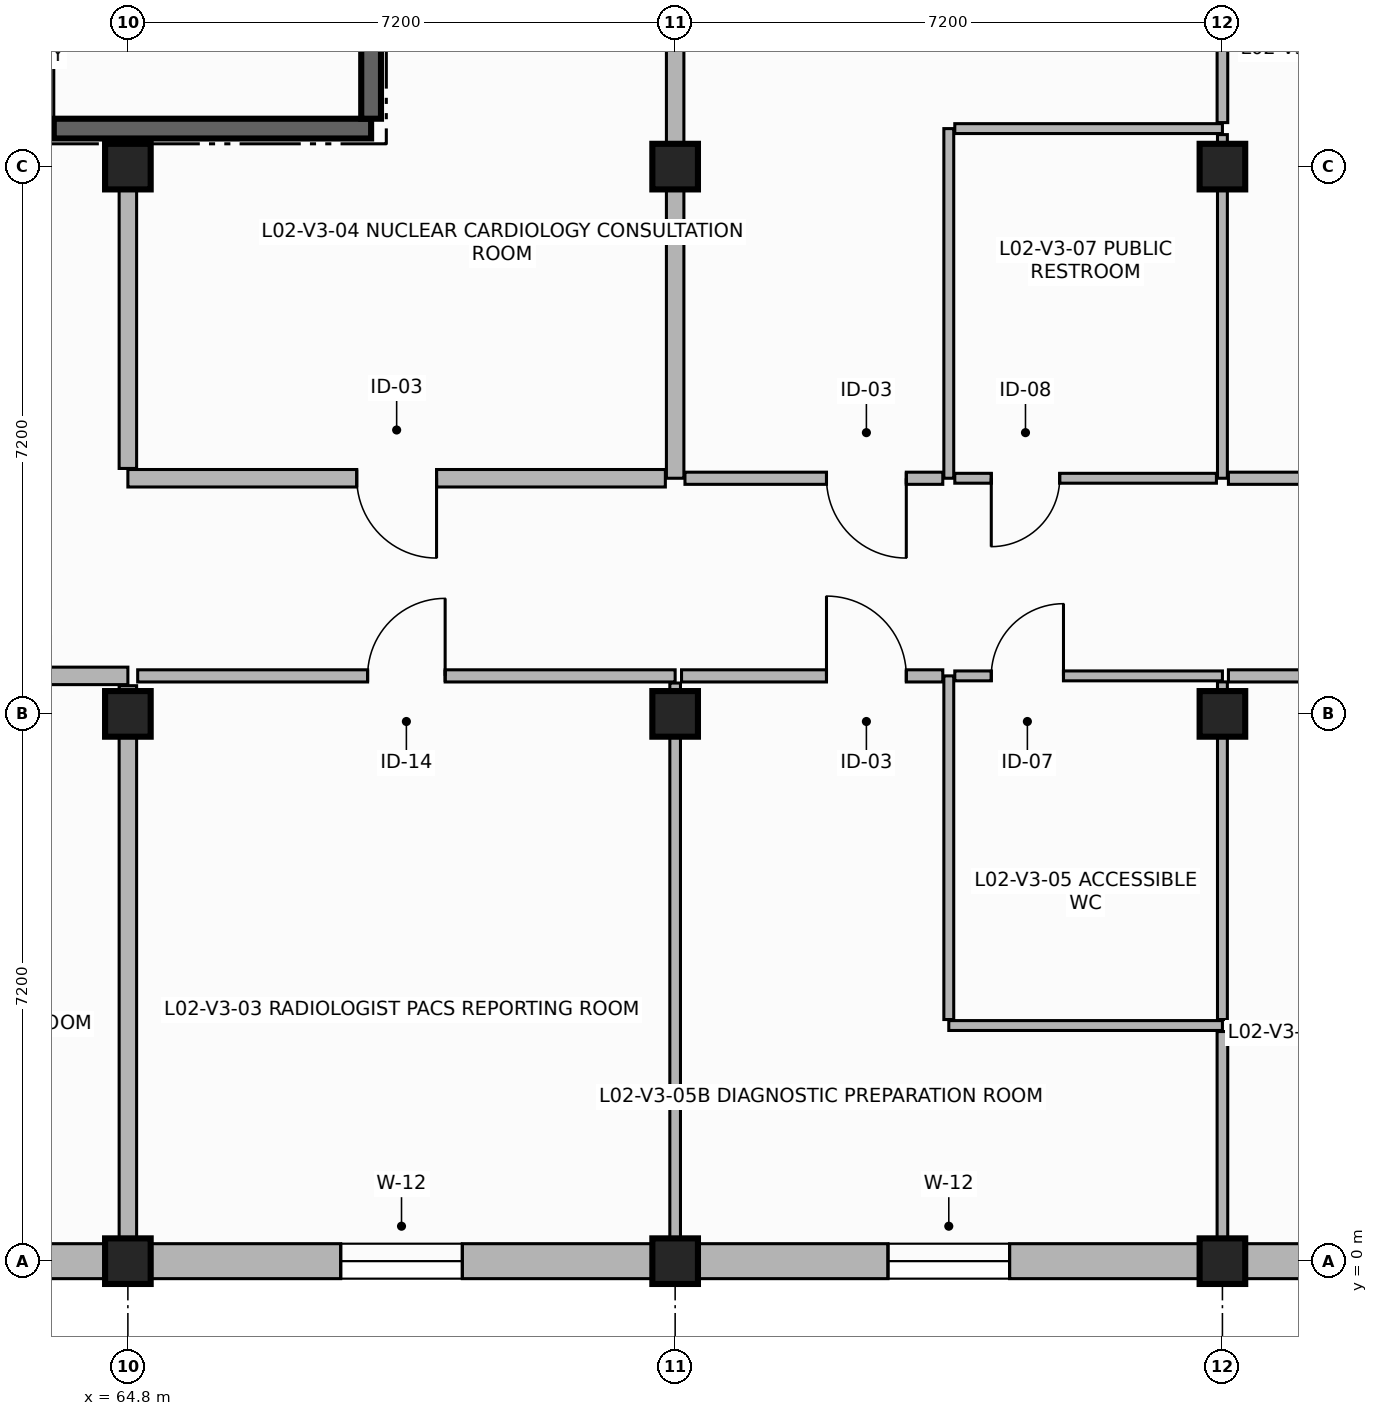
"""IFC4 building model, lengths in metres.
Left out: names, types, materials, properties, quantities, classifications, styles, units other than length and angle.
Written with IfcOpenShell. Run it as: python <this file> out.ifc"""

import sys

from ifc_helpers import new_model, si_unit, direction, frame, frame_2d, origin, origin_2d, place, context, subcontext, project, spatial, rectangle, extrude, element, fill, save


model = new_model("IFC4")
c1 = context("Model", 3, precision=1e-05, world=origin(), true_north=direction((0.0, 1.0)))
c2 = subcontext(c1, "Body", "Model", "MODEL_VIEW")
j1 = project(units=[si_unit("LENGTHUNIT", "METRE"), si_unit("PLANEANGLEUNIT", "RADIAN")], contexts=[c1])
p1 = place(None, origin())
s1 = spatial("IfcSite", under=j1, at=p1, CompositionType="ELEMENT")
p2 = place(p1, origin())
s2 = spatial("IfcBuilding", under=s1, at=p2, CompositionType="ELEMENT")
p3 = place(p2, frame((0.0, 0.0, 8.4)))
s3 = spatial("IfcBuildingStorey", under=s2, at=p3, CompositionType="ELEMENT", Elevation=8.4)
for number, where, z_axis, x_axis in (
    (1, (64.8, 0.0, 0.0), (0.0, 0.0, 1.0), (1.0, 0.0, 0.0)),
    (2, (64.8, 7.2, 0.0), (0.0, 0.0, 1.0), (1.0, 0.0, 0.0)),
    (3, (64.8, 14.4, 0.0), (0.0, 0.0, 1.0), (1.0, 0.0, 0.0)),
    (4, (72.0, 0.0, 0.0), (0.0, 0.0, 1.0), (1.0, 0.0, 0.0)),
    (5, (72.0, 7.2, 0.0), (0.0, 0.0, 1.0), (1.0, 0.0, 0.0)),
    (6, (72.0, 14.4, 0.0), (0.0, 0.0, 1.0), (1.0, 0.0, 0.0)),
    (7, (79.2, 0.0, 0.0), (0.0, 0.0, 1.0), (1.0, 0.0, 0.0)),
    (8, (79.2, 7.2, 0.0), (0.0, 0.0, 1.0), (1.0, 0.0, 0.0)),
    (9, (79.2, 14.4, 0.0), (0.0, 0.0, 1.0), (1.0, 0.0, 0.0)),
):
    element("IfcColumn", number, at=place(p3, frame(where, z_axis=z_axis, x_axis=x_axis)), inside=s3, PredefinedType="COLUMN", context=c2, shape_type="SweptSolid", body=[
        extrude(rectangle(XDim=0.6, YDim=0.6, at=origin_2d()), origin(), (0.0, 0.0, 1.0), 3.9),
    ])
p4 = place(p3, frame((57.6, 0.0, 0.0), z_axis=(0.0, 0.0, 1.0), x_axis=(1.0, 0.0, 0.0)))
e10 = element("IfcWall", 10, at=p4, inside=s3, PredefinedType="SOLIDWALL", context=c2, shape_type="SweptSolid", body=[
    extrude(rectangle(XDim=7.2, YDim=0.46, at=frame_2d((3.6, 0.0))), origin(), (0.0, 0.0, 1.0), 3.3),
])
p5 = place(p4, frame((2.8, 0.0, 1.2)))
e11 = element("IfcOpeningElement", 11, at=p5, cuts=e10, PredefinedType="OPENING", context=c2, shape_type="SweptSolid", body=[
    extrude(rectangle(XDim=1.6, YDim=1.4, at=frame_2d((0.8, 0.7))), frame((0.0, 0.24, 0.0), z_axis=(0.0, -1.0, 0.0), x_axis=(1.0, 0.0, 0.0)), (0.0, 0.0, 1.0), 0.48),
])
p6 = place(p3, frame((64.8, 0.0, 0.0), z_axis=(0.0, 0.0, 1.0), x_axis=(1.0, 0.0, 0.0)))
e12 = element("IfcWall", 12, at=p6, inside=s3, PredefinedType="SOLIDWALL", context=c2, shape_type="SweptSolid", body=[
    extrude(rectangle(XDim=7.2, YDim=0.46, at=frame_2d((3.6, 0.0))), origin(), (0.0, 0.0, 1.0), 3.3),
])
p7 = place(p6, frame((2.8, 0.0, 1.2)))
e13 = element("IfcOpeningElement", 13, at=p7, cuts=e12, PredefinedType="OPENING", context=c2, shape_type="SweptSolid", body=[
    extrude(rectangle(XDim=1.6, YDim=1.4, at=frame_2d((0.8, 0.7))), frame((0.0, 0.24, 0.0), z_axis=(0.0, -1.0, 0.0), x_axis=(1.0, 0.0, 0.0)), (0.0, 0.0, 1.0), 0.48),
])
p8 = place(p3, frame((72.0, 0.0, 0.0), z_axis=(0.0, 0.0, 1.0), x_axis=(1.0, 0.0, 0.0)))
e14 = element("IfcWall", 14, at=p8, inside=s3, PredefinedType="SOLIDWALL", context=c2, shape_type="SweptSolid", body=[
    extrude(rectangle(XDim=7.2, YDim=0.46, at=frame_2d((3.6, 0.0))), origin(), (0.0, 0.0, 1.0), 3.3),
])
p9 = place(p8, frame((2.8, 0.0, 1.2)))
e15 = element("IfcOpeningElement", 15, at=p9, cuts=e14, PredefinedType="OPENING", context=c2, shape_type="SweptSolid", body=[
    extrude(rectangle(XDim=1.6, YDim=1.4, at=frame_2d((0.8, 0.7))), frame((0.0, 0.24, 0.0), z_axis=(0.0, -1.0, 0.0), x_axis=(1.0, 0.0, 0.0)), (0.0, 0.0, 1.0), 0.48),
])
p10 = place(p3, frame((79.2, 0.0, 0.0), z_axis=(0.0, 0.0, 1.0), x_axis=(1.0, 0.0, 0.0)))
e16 = element("IfcWall", 16, at=p10, inside=s3, PredefinedType="SOLIDWALL", context=c2, shape_type="SweptSolid", body=[
    extrude(rectangle(XDim=7.2, YDim=0.46, at=frame_2d((3.6, 0.0))), origin(), (0.0, 0.0, 1.0), 3.3),
])
p11 = place(p10, frame((2.8, 0.0, 1.2)))
e17 = element("IfcOpeningElement", 17, at=p11, cuts=e16, PredefinedType="OPENING", context=c2, shape_type="SweptSolid", body=[
    extrude(rectangle(XDim=1.6, YDim=1.4, at=frame_2d((0.8, 0.7))), frame((0.0, 0.24, 0.0), z_axis=(0.0, -1.0, 0.0), x_axis=(1.0, 0.0, 0.0)), (0.0, 0.0, 1.0), 0.48),
])
p12 = place(p3, frame((58.5, 14.9, 0.0), z_axis=(0.0, 0.0, 1.0), x_axis=(1.0, 0.0, 0.0)))
e18 = element("IfcWall", 18, at=p12, inside=s3, PredefinedType="SHEAR", context=c2, shape_type="SweptSolid", body=[
    extrude(rectangle(XDim=9.5, YDim=0.26, at=frame_2d((4.75, 0.0))), origin(), (0.0, 0.0, 1.0), 3.72),
])
p13 = place(p12, frame((4.175, 0.0, 0.0)))
e19 = element("IfcOpeningElement", 19, at=p13, cuts=e18, PredefinedType="OPENING", context=c2, shape_type="SweptSolid", body=[
    extrude(rectangle(XDim=1.15, YDim=2.2, at=frame_2d((0.575, 1.1))), frame((0.0, 0.14, 0.0), z_axis=(0.0, -1.0, 0.0), x_axis=(1.0, 0.0, 0.0)), (0.0, 0.0, 1.0), 0.28),
])
p14 = place(p3, frame((68.0, 15.03, 0.0), z_axis=(0.0, 0.0, 1.0), x_axis=(0.0, 1.0, 0.0)))
e20 = element("IfcWall", 20, at=p14, inside=s3, PredefinedType="SHEAR", context=c2, shape_type="SweptSolid", body=[
    extrude(rectangle(XDim=5.54, YDim=0.26, at=frame_2d((2.77, 0.0))), origin(), (0.0, 0.0, 1.0), 3.72),
])
p15 = place(p3, frame((57.845, 7.7, 0.0), z_axis=(0.0, 0.0, 1.0), x_axis=(1.0, 0.0, 0.0)))
e21 = element("IfcWall", 21, at=p15, inside=s3, PredefinedType="PARTITIONING", context=c2, shape_type="SweptSolid", body=[
    extrude(rectangle(XDim=6.955, YDim=0.23, at=frame_2d((3.478, 0.0))), origin(), (0.0, 0.0, 1.0), 3.04),
])
p16 = place(p15, frame((2.562, 0.0, 0.0)))
e22 = element("IfcOpeningElement", 22, at=p16, cuts=e21, PredefinedType="OPENING", context=c2, shape_type="SweptSolid", body=[
    extrude(rectangle(XDim=1.6, YDim=2.3, at=frame_2d((0.8, 1.15))), frame((0.0, 0.125, 0.0), z_axis=(0.0, -1.0, 0.0), x_axis=(1.0, 0.0, 0.0)), (0.0, 0.0, 1.0), 0.25),
])
p17 = place(p3, frame((64.8, 7.571, 0.0), z_axis=(0.0, 0.0, 1.0), x_axis=(0.0, -1.0, 0.0)))
e23 = element("IfcWall", 23, at=p17, inside=s3, PredefinedType="PARTITIONING", context=c2, shape_type="SweptSolid", body=[
    extrude(rectangle(XDim=7.326, YDim=0.23, at=frame_2d((3.663, 0.0))), origin(), (0.0, 0.0, 1.0), 3.04),
])
p18 = place(p3, frame((64.929, 7.7, 0.0), z_axis=(0.0, 0.0, 1.0), x_axis=(1.0, 0.0, 0.0)))
e24 = element("IfcWall", 24, at=p18, inside=s3, PredefinedType="PARTITIONING", context=c2, shape_type="SweptSolid", body=[
    extrude(rectangle(XDim=7.071, YDim=0.16, at=frame_2d((3.536, 0.0))), origin(), (0.0, 0.0, 1.0), 3.04),
])
p19 = place(p18, frame((3.025, 0.0, 0.0)))
e25 = element("IfcOpeningElement", 25, at=p19, cuts=e24, PredefinedType="OPENING", context=c2, shape_type="SweptSolid", body=[
    extrude(rectangle(XDim=1.02, YDim=2.15, at=frame_2d((0.51, 1.075))), frame((0.0, 0.09, 0.0), z_axis=(0.0, -1.0, 0.0), x_axis=(1.0, 0.0, 0.0)), (0.0, 0.0, 1.0), 0.18),
])
p20 = place(p3, frame((72.0, 7.606, 0.0), z_axis=(0.0, 0.0, 1.0), x_axis=(0.0, -1.0, 0.0)))
e26 = element("IfcWall", 26, at=p20, inside=s3, PredefinedType="PARTITIONING", context=c2, shape_type="SweptSolid", body=[
    extrude(rectangle(XDim=7.361, YDim=0.14, at=frame_2d((3.68, 0.0))), origin(), (0.0, 0.0, 1.0), 3.04),
])
p21 = place(p3, frame((72.0, 21.355, 0.0), z_axis=(0.0, 0.0, 1.0), x_axis=(0.0, -1.0, 0.0)))
e27 = element("IfcWall", 27, at=p21, inside=s3, PredefinedType="PARTITIONING", context=c2, shape_type="SweptSolid", body=[
    extrude(rectangle(XDim=11.055, YDim=0.23, at=frame_2d((5.527, 0.0))), origin(), (0.0, 0.0, 1.0), 3.04),
])
p22 = place(p3, frame((71.871, 10.3, 0.0), z_axis=(0.0, 0.0, 1.0), x_axis=(-1.0, 0.0, 0.0)))
e28 = element("IfcWall", 28, at=p22, inside=s3, PredefinedType="PARTITIONING", context=c2, shape_type="SweptSolid", body=[
    extrude(rectangle(XDim=7.071, YDim=0.23, at=frame_2d((3.536, 0.0))), origin(), (0.0, 0.0, 1.0), 3.04),
])
p23 = place(p22, frame((3.01, 0.0, 0.0)))
e29 = element("IfcOpeningElement", 29, at=p23, cuts=e28, PredefinedType="OPENING", context=c2, shape_type="SweptSolid", body=[
    extrude(rectangle(XDim=1.05, YDim=2.15, at=frame_2d((0.525, 1.075))), frame((0.0, 0.125, 0.0), z_axis=(0.0, -1.0, 0.0), x_axis=(1.0, 0.0, 0.0)), (0.0, 0.0, 1.0), 0.25),
])
p24 = place(p3, frame((64.8, 10.429, 0.0), z_axis=(0.0, 0.0, 1.0), x_axis=(0.0, 1.0, 0.0)))
e30 = element("IfcWall", 30, at=p24, inside=s3, PredefinedType="PARTITIONING", context=c2, shape_type="SweptSolid", body=[
    extrude(rectangle(XDim=4.326, YDim=0.23, at=frame_2d((2.163, 0.0))), origin(), (0.0, 0.0, 1.0), 3.04),
])
p25 = place(p3, frame((79.2, 3.1, 0.0), z_axis=(0.0, 0.0, 1.0), x_axis=(-1.0, 0.0, 0.0)))
e31 = element("IfcWall", 31, at=p25, inside=s3, PredefinedType="PARTITIONING", context=c2, shape_type="SweptSolid", body=[
    extrude(rectangle(XDim=3.6, YDim=0.13, at=frame_2d((1.8, 0.0))), origin(), (0.0, 0.0, 1.0), 3.04),
])
p26 = place(p3, frame((75.6, 3.179, 0.0), z_axis=(0.0, 0.0, 1.0), x_axis=(0.0, 1.0, 0.0)))
e32 = element("IfcWall", 32, at=p26, inside=s3, PredefinedType="PARTITIONING", context=c2, shape_type="SweptSolid", body=[
    extrude(rectangle(XDim=4.521, YDim=0.13, at=frame_2d((2.26, 0.0))), origin(), (0.0, 0.0, 1.0), 3.04),
])
p27 = place(p3, frame((75.679, 7.7, 0.0), z_axis=(0.0, 0.0, 1.0), x_axis=(1.0, 0.0, 0.0)))
e33 = element("IfcWall", 33, at=p27, inside=s3, PredefinedType="PARTITIONING", context=c2, shape_type="SweptSolid", body=[
    extrude(rectangle(XDim=3.521, YDim=0.13, at=frame_2d((1.76, 0.0))), origin(), (0.0, 0.0, 1.0), 3.04),
])
p28 = place(p27, frame((0.48, 0.0, 0.0)))
e34 = element("IfcOpeningElement", 34, at=p28, cuts=e33, PredefinedType="OPENING", context=c2, shape_type="SweptSolid", body=[
    extrude(rectangle(XDim=0.95, YDim=2.1, at=frame_2d((0.475, 1.05))), frame((0.0, 0.075, 0.0), z_axis=(0.0, -1.0, 0.0), x_axis=(1.0, 0.0, 0.0)), (0.0, 0.0, 1.0), 0.15),
])
p29 = place(p3, frame((79.2, 7.621, 0.0), z_axis=(0.0, 0.0, 1.0), x_axis=(0.0, -1.0, 0.0)))
e35 = element("IfcWall", 35, at=p29, inside=s3, PredefinedType="PARTITIONING", context=c2, shape_type="SweptSolid", body=[
    extrude(rectangle(XDim=4.442, YDim=0.13, at=frame_2d((2.221, 0.0))), origin(), (0.0, 0.0, 1.0), 3.04),
])
p30 = place(p3, frame((79.2, 3.021, 0.0), z_axis=(0.0, 0.0, 1.0), x_axis=(0.0, -1.0, 0.0)))
e36 = element("IfcWall", 36, at=p30, inside=s3, PredefinedType="PARTITIONING", context=c2, shape_type="SweptSolid", body=[
    extrude(rectangle(XDim=2.776, YDim=0.14, at=frame_2d((1.388, 0.0))), origin(), (0.0, 0.0, 1.0), 3.04),
])
p31 = place(p3, frame((72.084, 7.7, 0.0), z_axis=(0.0, 0.0, 1.0), x_axis=(1.0, 0.0, 0.0)))
e37 = element("IfcWall", 37, at=p31, inside=s3, PredefinedType="PARTITIONING", context=c2, shape_type="SweptSolid", body=[
    extrude(rectangle(XDim=3.437, YDim=0.16, at=frame_2d((1.719, 0.0))), origin(), (0.0, 0.0, 1.0), 3.04),
])
p32 = place(p31, frame((1.907, 0.0, 0.0)))
e38 = element("IfcOpeningElement", 38, at=p32, cuts=e37, PredefinedType="OPENING", context=c2, shape_type="SweptSolid", body=[
    extrude(rectangle(XDim=1.05, YDim=2.15, at=frame_2d((0.525, 1.075))), frame((0.0, 0.09, 0.0), z_axis=(0.0, -1.0, 0.0), x_axis=(1.0, 0.0, 0.0)), (0.0, 0.0, 1.0), 0.18),
])
p33 = place(p3, frame((75.6, 10.3, 0.0), z_axis=(0.0, 0.0, 1.0), x_axis=(0.0, 1.0, 0.0)))
e39 = element("IfcWall", 39, at=p33, inside=s3, PredefinedType="PARTITIONING", context=c2, shape_type="SweptSolid", body=[
    extrude(rectangle(XDim=4.6, YDim=0.13, at=frame_2d((2.3, 0.0))), origin(), (0.0, 0.0, 1.0), 3.04),
])
p34 = place(p3, frame((75.679, 14.9, 0.0), z_axis=(0.0, 0.0, 1.0), x_axis=(1.0, 0.0, 0.0)))
e40 = element("IfcWall", 40, at=p34, inside=s3, PredefinedType="PARTITIONING", context=c2, shape_type="SweptSolid", body=[
    extrude(rectangle(XDim=3.521, YDim=0.13, at=frame_2d((1.76, 0.0))), origin(), (0.0, 0.0, 1.0), 3.04),
])
p35 = place(p3, frame((79.2, 14.821, 0.0), z_axis=(0.0, 0.0, 1.0), x_axis=(0.0, -1.0, 0.0)))
e41 = element("IfcWall", 41, at=p35, inside=s3, PredefinedType="PARTITIONING", context=c2, shape_type="SweptSolid", body=[
    extrude(rectangle(XDim=4.521, YDim=0.13, at=frame_2d((2.26, 0.0))), origin(), (0.0, 0.0, 1.0), 3.04),
])
p36 = place(p3, frame((79.121, 10.3, 0.0), z_axis=(0.0, 0.0, 1.0), x_axis=(-1.0, 0.0, 0.0)))
e42 = element("IfcWall", 42, at=p36, inside=s3, PredefinedType="PARTITIONING", context=c2, shape_type="SweptSolid", body=[
    extrude(rectangle(XDim=3.442, YDim=0.13, at=frame_2d((1.721, 0.0))), origin(), (0.0, 0.0, 1.0), 3.04),
])
p37 = place(p36, frame((2.062, 0.0, 0.0)))
e43 = element("IfcOpeningElement", 43, at=p37, cuts=e42, PredefinedType="OPENING", context=c2, shape_type="SweptSolid", body=[
    extrude(rectangle(XDim=0.9, YDim=2.1, at=frame_2d((0.45, 1.05))), frame((0.0, 0.075, 0.0), z_axis=(0.0, -1.0, 0.0), x_axis=(1.0, 0.0, 0.0)), (0.0, 0.0, 1.0), 0.15),
])
p38 = place(p3, frame((75.521, 10.3, 0.0), z_axis=(0.0, 0.0, 1.0), x_axis=(-1.0, 0.0, 0.0)))
e44 = element("IfcWall", 44, at=p38, inside=s3, PredefinedType="PARTITIONING", context=c2, shape_type="SweptSolid", body=[
    extrude(rectangle(XDim=3.392, YDim=0.16, at=frame_2d((1.696, 0.0))), origin(), (0.0, 0.0, 1.0), 3.04),
])
p39 = place(p38, frame((0.48, 0.0, 0.0)))
e45 = element("IfcOpeningElement", 45, at=p39, cuts=e44, PredefinedType="OPENING", context=c2, shape_type="SweptSolid", body=[
    extrude(rectangle(XDim=1.05, YDim=2.15, at=frame_2d((0.525, 1.075))), frame((0.0, 0.09, 0.0), z_axis=(0.0, -1.0, 0.0), x_axis=(1.0, 0.0, 0.0)), (0.0, 0.0, 1.0), 0.18),
])
p40 = place(p3, frame((79.2, 21.355, 0.0), z_axis=(0.0, 0.0, 1.0), x_axis=(0.0, -1.0, 0.0)))
e46 = element("IfcWall", 46, at=p40, inside=s3, PredefinedType="PARTITIONING", context=c2, shape_type="SweptSolid", body=[
    extrude(rectangle(XDim=6.376, YDim=0.14, at=frame_2d((3.188, 0.0))), origin(), (0.0, 0.0, 1.0), 3.04),
])
p41 = place(p3, frame((79.279, 7.7, 0.0), z_axis=(0.0, 0.0, 1.0), x_axis=(1.0, 0.0, 0.0)))
e47 = element("IfcWall", 47, at=p41, inside=s3, PredefinedType="PARTITIONING", context=c2, shape_type="SweptSolid", body=[
    extrude(rectangle(XDim=6.876, YDim=0.16, at=frame_2d((3.438, 0.0))), origin(), (0.0, 0.0, 1.0), 3.04),
])
p42 = place(p41, frame((3.055, 0.0, 0.0)))
e48 = element("IfcOpeningElement", 48, at=p42, cuts=e47, PredefinedType="OPENING", context=c2, shape_type="SweptSolid", body=[
    extrude(rectangle(XDim=1.0, YDim=2.15, at=frame_2d((0.5, 1.075))), frame((0.0, 0.09, 0.0), z_axis=(0.0, -1.0, 0.0), x_axis=(1.0, 0.0, 0.0)), (0.0, 0.0, 1.0), 0.18),
])
p43 = place(p3, frame((86.155, 10.3, 0.0), z_axis=(0.0, 0.0, 1.0), x_axis=(-1.0, 0.0, 0.0)))
e49 = element("IfcWall", 49, at=p43, inside=s3, PredefinedType="PARTITIONING", context=c2, shape_type="SweptSolid", body=[
    extrude(rectangle(XDim=6.876, YDim=0.16, at=frame_2d((3.438, 0.0))), origin(), (0.0, 0.0, 1.0), 3.04),
])
p44 = place(p43, frame((2.75, 0.0, 0.0)))
e50 = element("IfcOpeningElement", 50, at=p44, cuts=e49, PredefinedType="OPENING", context=c2, shape_type="SweptSolid", body=[
    extrude(rectangle(XDim=1.15, YDim=2.25, at=frame_2d((0.575, 1.125))), frame((0.0, 0.09, 0.0), z_axis=(0.0, -1.0, 0.0), x_axis=(1.0, 0.0, 0.0)), (0.0, 0.0, 1.0), 0.18),
])
p45 = place(p7, origin())
e51 = element("IfcWindow", 51, at=p45, inside=s3, PartitioningType="SINGLE_PANEL", PredefinedType="WINDOW", context=c2, shape_type="SweptSolid", body=[
    extrude(rectangle(XDim=1.6, YDim=1.4, at=frame_2d((0.8, 0.7))), frame((0.0, 0.03, 0.0), z_axis=(0.0, -1.0, 0.0), x_axis=(1.0, 0.0, 0.0)), (0.0, 0.0, 1.0), 0.06),
])
fill(e13, e51)
p46 = place(p9, origin())
e52 = element("IfcWindow", 52, at=p46, inside=s3, PartitioningType="SINGLE_PANEL", PredefinedType="WINDOW", context=c2, shape_type="SweptSolid", body=[
    extrude(rectangle(XDim=1.6, YDim=1.4, at=frame_2d((0.8, 0.7))), frame((0.0, 0.03, 0.0), z_axis=(0.0, -1.0, 0.0), x_axis=(1.0, 0.0, 0.0)), (0.0, 0.0, 1.0), 0.06),
])
fill(e15, e52)
p47 = place(p13, origin())
e53 = element("IfcDoor", 53, at=p47, inside=s3, OperationType="SINGLE_SWING_RIGHT", PredefinedType="DOOR", context=c2, shape_type="SweptSolid", body=[
    extrude(rectangle(XDim=1.15, YDim=2.2, at=frame_2d((0.575, 1.1))), frame((0.0, 0.025, 0.0), z_axis=(0.0, -1.0, 0.0), x_axis=(1.0, 0.0, 0.0)), (0.0, 0.0, 1.0), 0.05),
])
fill(e19, e53)
p48 = place(p19, origin())
e54 = element("IfcDoor", 54, at=p48, inside=s3, OperationType="SINGLE_SWING_RIGHT", PredefinedType="DOOR", context=c2, shape_type="SweptSolid", body=[
    extrude(rectangle(XDim=1.02, YDim=2.15, at=frame_2d((0.51, 1.075))), frame((0.0, 0.025, 0.0), z_axis=(0.0, -1.0, 0.0), x_axis=(1.0, 0.0, 0.0)), (0.0, 0.0, 1.0), 0.05),
])
fill(e25, e54)
p49 = place(p23, origin())
e55 = element("IfcDoor", 55, at=p49, inside=s3, OperationType="SINGLE_SWING_LEFT", PredefinedType="DOOR", context=c2, shape_type="SweptSolid", body=[
    extrude(rectangle(XDim=1.05, YDim=2.15, at=frame_2d((0.525, 1.075))), frame((0.0, 0.025, 0.0), z_axis=(0.0, -1.0, 0.0), x_axis=(1.0, 0.0, 0.0)), (0.0, 0.0, 1.0), 0.05),
])
fill(e29, e55)
p50 = place(p28, origin())
e56 = element("IfcDoor", 56, at=p50, inside=s3, OperationType="SINGLE_SWING_RIGHT", PredefinedType="DOOR", context=c2, shape_type="SweptSolid", body=[
    extrude(rectangle(XDim=0.95, YDim=2.1, at=frame_2d((0.475, 1.05))), frame((0.0, 0.025, 0.0), z_axis=(0.0, -1.0, 0.0), x_axis=(1.0, 0.0, 0.0)), (0.0, 0.0, 1.0), 0.05),
])
fill(e34, e56)
p51 = place(p32, origin())
e57 = element("IfcDoor", 57, at=p51, inside=s3, OperationType="SINGLE_SWING_LEFT", PredefinedType="DOOR", context=c2, shape_type="SweptSolid", body=[
    extrude(rectangle(XDim=1.05, YDim=2.15, at=frame_2d((0.525, 1.075))), frame((0.0, 0.025, 0.0), z_axis=(0.0, -1.0, 0.0), x_axis=(1.0, 0.0, 0.0)), (0.0, 0.0, 1.0), 0.05),
])
fill(e38, e57)
p52 = place(p37, origin())
e58 = element("IfcDoor", 58, at=p52, inside=s3, OperationType="SINGLE_SWING_RIGHT", PredefinedType="DOOR", context=c2, shape_type="SweptSolid", body=[
    extrude(rectangle(XDim=0.9, YDim=2.1, at=frame_2d((0.45, 1.05))), frame((0.0, 0.025, 0.0), z_axis=(0.0, -1.0, 0.0), x_axis=(1.0, 0.0, 0.0)), (0.0, 0.0, 1.0), 0.05),
])
fill(e43, e58)
p53 = place(p39, origin())
e59 = element("IfcDoor", 59, at=p53, inside=s3, OperationType="SINGLE_SWING_LEFT", PredefinedType="DOOR", context=c2, shape_type="SweptSolid", body=[
    extrude(rectangle(XDim=1.05, YDim=2.15, at=frame_2d((0.525, 1.075))), frame((0.0, 0.025, 0.0), z_axis=(0.0, -1.0, 0.0), x_axis=(1.0, 0.0, 0.0)), (0.0, 0.0, 1.0), 0.05),
])
fill(e45, e59)
save(model, sys.argv[1])
